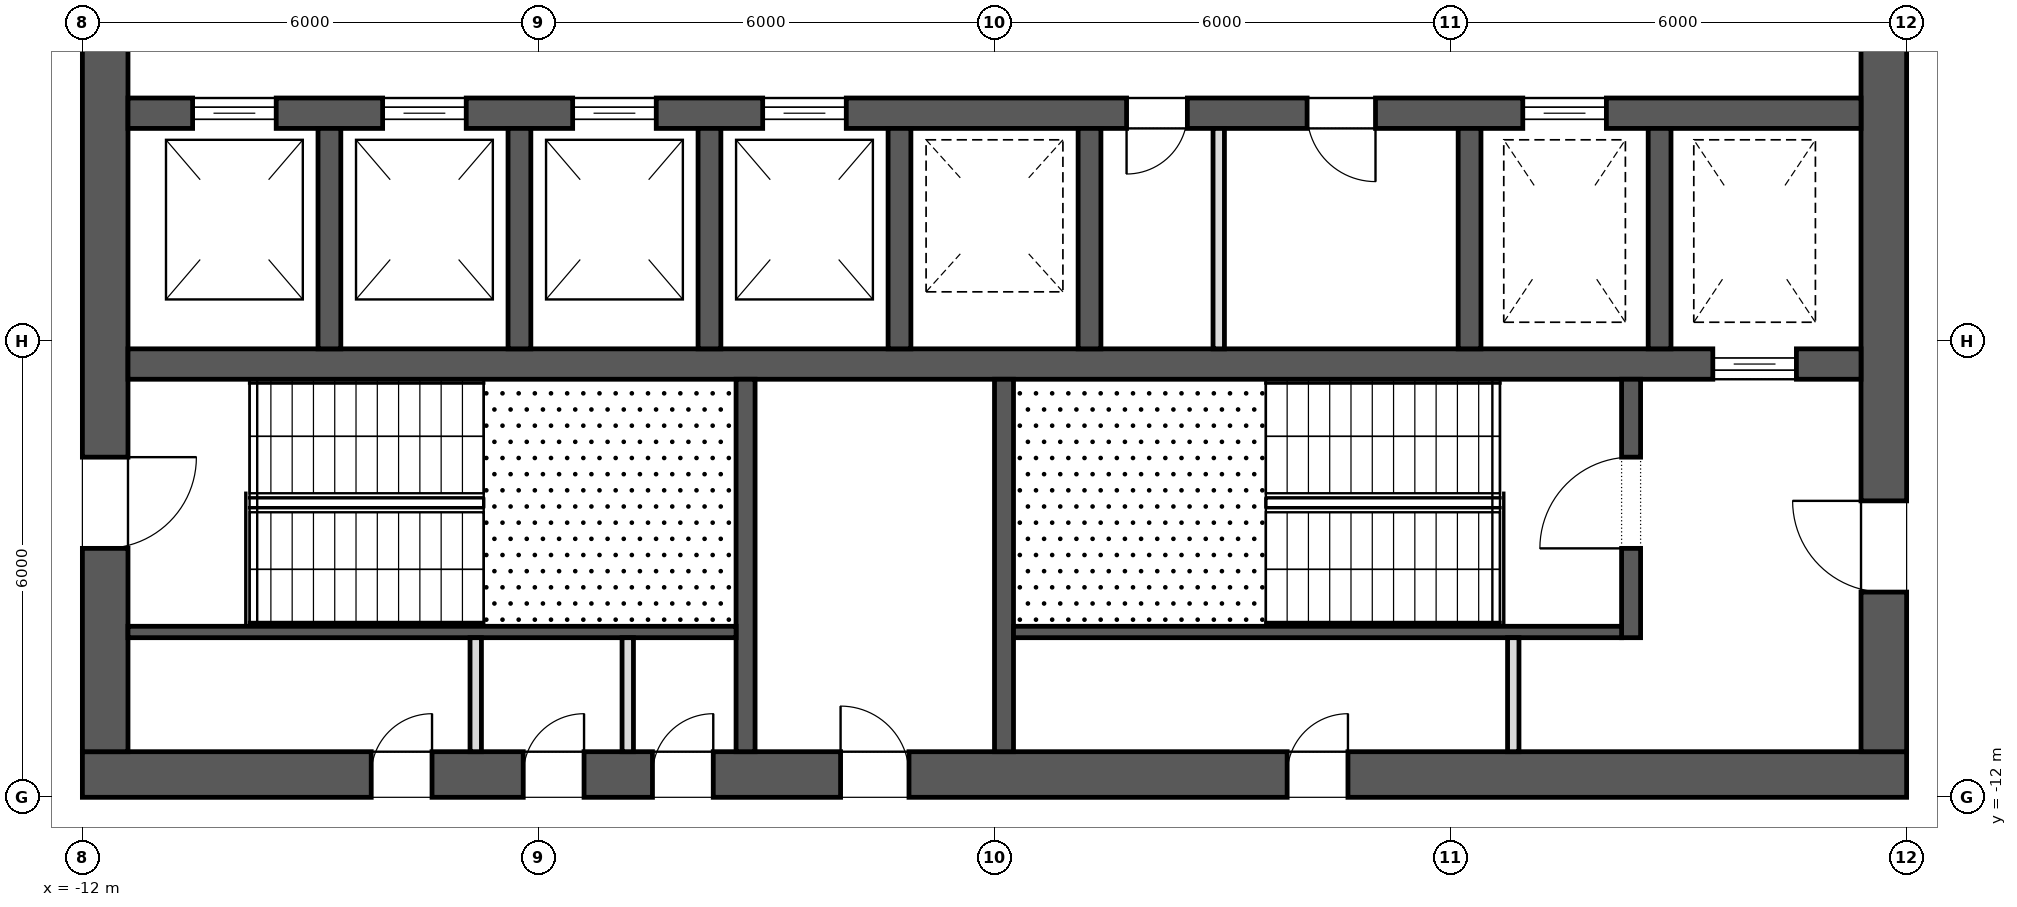
"""IFC4 building model, lengths in metres.
Left out: names, types, materials, properties, quantities, classifications, styles, units other than length and angle.
Written with IfcOpenShell. Run it as: python <this file> out.ifc"""

import sys

from ifc_helpers import new_model, si_unit, direction, frame, frame_2d, origin, place, context, subcontext, project, spatial, rectangle, extrude, element, fill, save


model = new_model("IFC4")
c1 = context("Model", 3, precision=1e-05, world=origin(), true_north=direction((0.0, 1.0)))
c2 = subcontext(c1, "Body", "Model", "MODEL_VIEW")
j1 = project(units=[si_unit("LENGTHUNIT", "METRE"), si_unit("PLANEANGLEUNIT", "RADIAN")], contexts=[c1])
p1 = place(None, origin())
s1 = spatial("IfcSite", under=j1, at=p1, CompositionType="ELEMENT")
p2 = place(p1, origin())
s2 = spatial("IfcBuilding", under=s1, at=p2, CompositionType="ELEMENT")
p3 = place(p2, frame((0.0, 0.0, 178.9)))
s3 = spatial("IfcBuildingStorey", under=s2, at=p3, CompositionType="ELEMENT", Elevation=178.9)
p4 = place(p3, frame((-12.0, -11.7, 0.0), z_axis=(0.0, 0.0, 1.0), x_axis=(1.0, 0.0, 0.0)))
e1 = element("IfcWall", 1, at=p4, inside=s3, PredefinedType="SHEAR", context=c2, shape_type="SweptSolid", body=[
    extrude(rectangle(XDim=24.0, YDim=0.6, at=frame_2d((12.0, 0.0))), origin(), (0.0, 0.0, 1.0), 4.0),
])
p5 = place(p4, frame((9.975, 0.0, 0.0)))
e2 = element("IfcOpeningElement", 2, at=p5, cuts=e1, PredefinedType="OPENING", context=c2, shape_type="SweptSolid", body=[
    extrude(rectangle(XDim=0.9, YDim=2.1, at=frame_2d((0.45, 1.05))), frame((0.0, 0.312, 0.0), z_axis=(0.0, -1.0, 0.0), x_axis=(1.0, 0.0, 0.0)), (0.0, 0.0, 1.0), 0.624),
])
p6 = place(p4, frame((3.8, 0.0, 0.0)))
e3 = element("IfcOpeningElement", 3, at=p6, cuts=e1, PredefinedType="OPENING", context=c2, shape_type="SweptSolid", body=[
    extrude(rectangle(XDim=0.8, YDim=2.1, at=frame_2d((0.4, 1.05))), frame((0.0, 0.312, 0.0), z_axis=(0.0, -1.0, 0.0), x_axis=(1.0, 0.0, 0.0)), (0.0, 0.0, 1.0), 0.624),
])
p7 = place(p4, frame((5.8, 0.0, 0.0)))
e4 = element("IfcOpeningElement", 4, at=p7, cuts=e1, PredefinedType="OPENING", context=c2, shape_type="SweptSolid", body=[
    extrude(rectangle(XDim=0.8, YDim=2.1, at=frame_2d((0.4, 1.05))), frame((0.0, 0.312, 0.0), z_axis=(0.0, -1.0, 0.0), x_axis=(1.0, 0.0, 0.0)), (0.0, 0.0, 1.0), 0.624),
])
p8 = place(p4, frame((7.5, 0.0, 0.0)))
e5 = element("IfcOpeningElement", 5, at=p8, cuts=e1, PredefinedType="OPENING", context=c2, shape_type="SweptSolid", body=[
    extrude(rectangle(XDim=0.8, YDim=2.1, at=frame_2d((0.4, 1.05))), frame((0.0, 0.312, 0.0), z_axis=(0.0, -1.0, 0.0), x_axis=(1.0, 0.0, 0.0)), (0.0, 0.0, 1.0), 0.624),
])
p9 = place(p4, frame((15.85, 0.0, 0.0)))
e6 = element("IfcOpeningElement", 6, at=p9, cuts=e1, PredefinedType="OPENING", context=c2, shape_type="SweptSolid", body=[
    extrude(rectangle(XDim=0.8, YDim=2.1, at=frame_2d((0.4, 1.05))), frame((0.0, 0.312, 0.0), z_axis=(0.0, -1.0, 0.0), x_axis=(1.0, 0.0, 0.0)), (0.0, 0.0, 1.0), 0.624),
])
p10 = place(p3, frame((11.7, -11.4, 0.0), z_axis=(0.0, 0.0, 1.0), x_axis=(0.0, 1.0, 0.0)))
e7 = element("IfcWall", 7, at=p10, inside=s3, PredefinedType="SHEAR", context=c2, shape_type="SweptSolid", body=[
    extrude(rectangle(XDim=22.8, YDim=0.6, at=frame_2d((11.4, 0.0))), origin(), (0.0, 0.0, 1.0), 4.0),
])
p11 = place(p10, frame((10.2, 0.0, 0.0)))
e8 = element("IfcOpeningElement", 8, at=p11, cuts=e7, PredefinedType="OPENING", context=c2, shape_type="SweptSolid", body=[
    extrude(rectangle(XDim=2.4, YDim=2.1, at=frame_2d((1.2, 1.05))), frame((0.0, 0.312, 0.0), z_axis=(0.0, -1.0, 0.0), x_axis=(1.0, 0.0, 0.0)), (0.0, 0.0, 1.0), 0.624),
])
p12 = place(p10, frame((19.5, 0.0, 0.0)))
e9 = element("IfcOpeningElement", 9, at=p12, cuts=e7, PredefinedType="OPENING", context=c2, shape_type="SweptSolid", body=[
    extrude(rectangle(XDim=1.2, YDim=2.1, at=frame_2d((0.6, 1.05))), frame((0.0, 0.312, 0.0), z_axis=(0.0, -1.0, 0.0), x_axis=(1.0, 0.0, 0.0)), (0.0, 0.0, 1.0), 0.624),
])
p13 = place(p10, frame((2.1, 0.0, 0.0)))
e10 = element("IfcOpeningElement", 10, at=p13, cuts=e7, PredefinedType="OPENING", context=c2, shape_type="SweptSolid", body=[
    extrude(rectangle(XDim=1.2, YDim=2.1, at=frame_2d((0.6, 1.05))), frame((0.0, 0.312, 0.0), z_axis=(0.0, -1.0, 0.0), x_axis=(1.0, 0.0, 0.0)), (0.0, 0.0, 1.0), 0.624),
])
p14 = place(p3, frame((-11.7, -11.4, 0.0), z_axis=(0.0, 0.0, 1.0), x_axis=(0.0, 1.0, 0.0)))
e11 = element("IfcWall", 11, at=p14, inside=s3, PredefinedType="SHEAR", context=c2, shape_type="SweptSolid", body=[
    extrude(rectangle(XDim=22.8, YDim=0.6, at=frame_2d((11.4, 0.0))), origin(), (0.0, 0.0, 1.0), 4.0),
])
p15 = place(p14, frame((10.2, 0.0, 0.0)))
e12 = element("IfcOpeningElement", 12, at=p15, cuts=e11, PredefinedType="OPENING", context=c2, shape_type="SweptSolid", body=[
    extrude(rectangle(XDim=2.4, YDim=2.1, at=frame_2d((1.2, 1.05))), frame((0.0, 0.312, 0.0), z_axis=(0.0, -1.0, 0.0), x_axis=(1.0, 0.0, 0.0)), (0.0, 0.0, 1.0), 0.624),
])
p16 = place(p14, frame((18.925, 0.0, 0.0)))
e13 = element("IfcOpeningElement", 13, at=p16, cuts=e11, PredefinedType="OPENING", context=c2, shape_type="SweptSolid", body=[
    extrude(rectangle(XDim=1.2, YDim=2.1, at=frame_2d((0.6, 1.05))), frame((0.0, 0.312, 0.0), z_axis=(0.0, -1.0, 0.0), x_axis=(1.0, 0.0, 0.0)), (0.0, 0.0, 1.0), 0.624),
])
p17 = place(p14, frame((2.675, 0.0, 0.0)))
e14 = element("IfcOpeningElement", 14, at=p17, cuts=e11, PredefinedType="OPENING", context=c2, shape_type="SweptSolid", body=[
    extrude(rectangle(XDim=1.2, YDim=2.1, at=frame_2d((0.6, 1.05))), frame((0.0, 0.312, 0.0), z_axis=(0.0, -1.0, 0.0), x_axis=(1.0, 0.0, 0.0)), (0.0, 0.0, 1.0), 0.624),
])
p18 = place(p3, frame((-11.4, -3.0, 0.0), z_axis=(0.0, 0.0, 1.0), x_axis=(1.0, 0.0, 0.0)))
e15 = element("IfcWall", 15, at=p18, inside=s3, PredefinedType="SHEAR", context=c2, shape_type="SweptSolid", body=[
    extrude(rectangle(XDim=22.8, YDim=0.4, at=frame_2d((11.4, 0.0))), origin(), (0.0, 0.0, 1.0), 4.0),
])
p19 = place(p18, frame((0.85, 0.0, 0.0)))
e16 = element("IfcOpeningElement", 16, at=p19, cuts=e15, PredefinedType="OPENING", context=c2, shape_type="SweptSolid", body=[
    extrude(rectangle(XDim=1.1, YDim=2.1, at=frame_2d((0.55, 1.05))), frame((0.0, 0.212, 0.0), z_axis=(0.0, -1.0, 0.0), x_axis=(1.0, 0.0, 0.0)), (0.0, 0.0, 1.0), 0.424),
])
p20 = place(p18, frame((3.35, 0.0, 0.0)))
e17 = element("IfcOpeningElement", 17, at=p20, cuts=e15, PredefinedType="OPENING", context=c2, shape_type="SweptSolid", body=[
    extrude(rectangle(XDim=1.1, YDim=2.1, at=frame_2d((0.55, 1.05))), frame((0.0, 0.212, 0.0), z_axis=(0.0, -1.0, 0.0), x_axis=(1.0, 0.0, 0.0)), (0.0, 0.0, 1.0), 0.424),
])
p21 = place(p18, frame((5.85, 0.0, 0.0)))
e18 = element("IfcOpeningElement", 18, at=p21, cuts=e15, PredefinedType="OPENING", context=c2, shape_type="SweptSolid", body=[
    extrude(rectangle(XDim=1.1, YDim=2.1, at=frame_2d((0.55, 1.05))), frame((0.0, 0.212, 0.0), z_axis=(0.0, -1.0, 0.0), x_axis=(1.0, 0.0, 0.0)), (0.0, 0.0, 1.0), 0.424),
])
p22 = place(p18, frame((8.35, 0.0, 0.0)))
e19 = element("IfcOpeningElement", 19, at=p22, cuts=e15, PredefinedType="OPENING", context=c2, shape_type="SweptSolid", body=[
    extrude(rectangle(XDim=1.1, YDim=2.1, at=frame_2d((0.55, 1.05))), frame((0.0, 0.212, 0.0), z_axis=(0.0, -1.0, 0.0), x_axis=(1.0, 0.0, 0.0)), (0.0, 0.0, 1.0), 0.424),
])
p23 = place(p18, frame((18.35, 0.0, 0.0)))
e20 = element("IfcOpeningElement", 20, at=p23, cuts=e15, PredefinedType="OPENING", context=c2, shape_type="SweptSolid", body=[
    extrude(rectangle(XDim=1.1, YDim=2.1, at=frame_2d((0.55, 1.05))), frame((0.0, 0.212, 0.0), z_axis=(0.0, -1.0, 0.0), x_axis=(1.0, 0.0, 0.0)), (0.0, 0.0, 1.0), 0.424),
])
p24 = place(p18, frame((13.137, 0.0, 0.0)))
e21 = element("IfcOpeningElement", 21, at=p24, cuts=e15, PredefinedType="OPENING", context=c2, shape_type="SweptSolid", body=[
    extrude(rectangle(XDim=0.8, YDim=2.1, at=frame_2d((0.4, 1.05))), frame((0.0, 0.212, 0.0), z_axis=(0.0, -1.0, 0.0), x_axis=(1.0, 0.0, 0.0)), (0.0, 0.0, 1.0), 0.424),
])
p25 = place(p18, frame((15.512, 0.0, 0.0)))
e22 = element("IfcOpeningElement", 22, at=p25, cuts=e15, PredefinedType="OPENING", context=c2, shape_type="SweptSolid", body=[
    extrude(rectangle(XDim=0.9, YDim=2.1, at=frame_2d((0.45, 1.05))), frame((0.0, 0.212, 0.0), z_axis=(0.0, -1.0, 0.0), x_axis=(1.0, 0.0, 0.0)), (0.0, 0.0, 1.0), 0.424),
])
p26 = place(p3, frame((-11.4, -6.3, 0.0), z_axis=(0.0, 0.0, 1.0), x_axis=(1.0, 0.0, 0.0)))
e23 = element("IfcWall", 23, at=p26, inside=s3, PredefinedType="SHEAR", context=c2, shape_type="SweptSolid", body=[
    extrude(rectangle(XDim=22.8, YDim=0.4, at=frame_2d((11.4, 0.0))), origin(), (0.0, 0.0, 1.0), 4.0),
])
p27 = place(p26, frame((20.85, 0.0, 0.0)))
e24 = element("IfcOpeningElement", 24, at=p27, cuts=e23, PredefinedType="OPENING", context=c2, shape_type="SweptSolid", body=[
    extrude(rectangle(XDim=1.1, YDim=2.1, at=frame_2d((0.55, 1.05))), frame((0.0, 0.212, 0.0), z_axis=(0.0, -1.0, 0.0), x_axis=(1.0, 0.0, 0.0)), (0.0, 0.0, 1.0), 0.424),
])
for number, where, z_axis, x_axis in (
    (25, (-8.75, -6.1, 0.0), (0.0, 0.0, 1.0), (0.0, 1.0, 0.0)),
    (26, (-6.25, -6.1, 0.0), (0.0, 0.0, 1.0), (0.0, 1.0, 0.0)),
    (27, (-3.75, -6.1, 0.0), (0.0, 0.0, 1.0), (0.0, 1.0, 0.0)),
    (28, (-1.25, -6.1, 0.0), (0.0, 0.0, 1.0), (0.0, 1.0, 0.0)),
    (29, (1.25, -6.1, 0.0), (0.0, 0.0, 1.0), (0.0, 1.0, 0.0)),
    (30, (6.25, -6.1, 0.0), (0.0, 0.0, 1.0), (0.0, 1.0, 0.0)),
    (31, (8.75, -6.1, 0.0), (0.0, 0.0, 1.0), (0.0, 1.0, 0.0)),
):
    element("IfcWall", number, at=place(p3, frame(where, z_axis=z_axis, x_axis=x_axis)), inside=s3, PredefinedType="SHEAR", context=c2, shape_type="SweptSolid", body=[
        extrude(rectangle(XDim=2.9, YDim=0.3, at=frame_2d((1.45, 0.0))), origin(), (0.0, 0.0, 1.0), 4.0),
    ])
for number, where, z_axis, x_axis in (
    (32, (-3.275, -11.4, 0.0), (0.0, 0.0, 1.0), (0.0, 1.0, 0.0)),
    (33, (0.125, -11.4, 0.0), (0.0, 0.0, 1.0), (0.0, 1.0, 0.0)),
):
    element("IfcWall", number, at=place(p3, frame(where, z_axis=z_axis, x_axis=x_axis)), inside=s3, PredefinedType="SHEAR", context=c2, shape_type="SweptSolid", body=[
        extrude(rectangle(XDim=4.9, YDim=0.25, at=frame_2d((2.45, 0.0))), origin(), (0.0, 0.0, 1.0), 3.7),
    ])
p28 = place(p3, frame((8.375, -9.9, 0.0), z_axis=(0.0, 0.0, 1.0), x_axis=(0.0, 1.0, 0.0)))
e34 = element("IfcWall", 34, at=p28, inside=s3, PredefinedType="SHEAR", context=c2, shape_type="SweptSolid", body=[
    extrude(rectangle(XDim=3.4, YDim=0.25, at=frame_2d((1.7, 0.0))), origin(), (0.0, 0.0, 1.0), 3.7),
])
p29 = place(p28, frame((1.175, 0.0, 0.0)))
e35 = element("IfcOpeningElement", 35, at=p29, cuts=e34, PredefinedType="OPENING", context=c2, shape_type="SweptSolid", body=[
    extrude(rectangle(XDim=1.2, YDim=2.1, at=frame_2d((0.6, 1.05))), frame((0.0, 0.137, 0.0), z_axis=(0.0, -1.0, 0.0), x_axis=(1.0, 0.0, 0.0)), (0.0, 0.0, 1.0), 0.274),
])
for number, where, z_axis, x_axis in (
    (36, (-11.4, -9.825, 0.0), (0.0, 0.0, 1.0), (1.0, 0.0, 0.0)),
    (37, (0.25, -9.825, 0.0), (0.0, 0.0, 1.0), (1.0, 0.0, 0.0)),
):
    element("IfcWall", number, at=place(p3, frame(where, z_axis=z_axis, x_axis=x_axis)), inside=s3, PredefinedType="SHEAR", context=c2, shape_type="SweptSolid", body=[
        extrude(rectangle(XDim=8.0, YDim=0.15, at=frame_2d((4.0, 0.0))), origin(), (0.0, 0.0, 1.0), 3.7),
    ])
for number, where, z_axis, x_axis in (
    (38, (-6.825, -11.4, 0.0), (0.0, 0.0, 1.0), (0.0, 1.0, 0.0)),
    (39, (-4.825, -11.4, 0.0), (0.0, 0.0, 1.0), (0.0, 1.0, 0.0)),
    (40, (6.825, -11.4, 0.0), (0.0, 0.0, 1.0), (0.0, 1.0, 0.0)),
):
    element("IfcWall", number, at=place(p3, frame(where, z_axis=z_axis, x_axis=x_axis)), inside=s3, PredefinedType="PARTITIONING", context=c2, shape_type="SweptSolid", body=[
        extrude(rectangle(XDim=1.5, YDim=0.15, at=frame_2d((0.75, 0.0))), origin(), (0.0, 0.0, 1.0), 3.7),
    ])
p30 = place(p3, frame((2.95, -6.1, 0.0), z_axis=(0.0, 0.0, 1.0), x_axis=(0.0, 1.0, 0.0)))
e41 = element("IfcWall", 41, at=p30, inside=s3, PredefinedType="PARTITIONING", context=c2, shape_type="SweptSolid", body=[
    extrude(rectangle(XDim=2.9, YDim=0.15, at=frame_2d((1.45, 0.0))), origin(), (0.0, 0.0, 1.0), 3.7),
])
p31 = place(p27, origin())
e42 = element("IfcDoor", 42, at=p31, inside=s3, OperationType="SLIDING_TO_LEFT", PredefinedType="DOOR", context=c2, shape_type="SweptSolid", body=[
    extrude(rectangle(XDim=1.1, YDim=2.1, at=frame_2d((0.55, 1.05))), frame((0.0, 0.025, 0.0), z_axis=(0.0, -1.0, 0.0), x_axis=(1.0, 0.0, 0.0)), (0.0, 0.0, 1.0), 0.05),
])
fill(e24, e42)
p32 = place(p19, origin())
e43 = element("IfcDoor", 43, at=p32, inside=s3, OperationType="SLIDING_TO_LEFT", PredefinedType="DOOR", context=c2, shape_type="SweptSolid", body=[
    extrude(rectangle(XDim=1.1, YDim=2.1, at=frame_2d((0.55, 1.05))), frame((0.0, 0.025, 0.0), z_axis=(0.0, -1.0, 0.0), x_axis=(1.0, 0.0, 0.0)), (0.0, 0.0, 1.0), 0.05),
])
fill(e16, e43)
p33 = place(p20, origin())
e44 = element("IfcDoor", 44, at=p33, inside=s3, OperationType="SLIDING_TO_LEFT", PredefinedType="DOOR", context=c2, shape_type="SweptSolid", body=[
    extrude(rectangle(XDim=1.1, YDim=2.1, at=frame_2d((0.55, 1.05))), frame((0.0, 0.025, 0.0), z_axis=(0.0, -1.0, 0.0), x_axis=(1.0, 0.0, 0.0)), (0.0, 0.0, 1.0), 0.05),
])
fill(e17, e44)
p34 = place(p21, origin())
e45 = element("IfcDoor", 45, at=p34, inside=s3, OperationType="SLIDING_TO_LEFT", PredefinedType="DOOR", context=c2, shape_type="SweptSolid", body=[
    extrude(rectangle(XDim=1.1, YDim=2.1, at=frame_2d((0.55, 1.05))), frame((0.0, 0.025, 0.0), z_axis=(0.0, -1.0, 0.0), x_axis=(1.0, 0.0, 0.0)), (0.0, 0.0, 1.0), 0.05),
])
fill(e18, e45)
p35 = place(p22, origin())
e46 = element("IfcDoor", 46, at=p35, inside=s3, OperationType="SLIDING_TO_LEFT", PredefinedType="DOOR", context=c2, shape_type="SweptSolid", body=[
    extrude(rectangle(XDim=1.1, YDim=2.1, at=frame_2d((0.55, 1.05))), frame((0.0, 0.025, 0.0), z_axis=(0.0, -1.0, 0.0), x_axis=(1.0, 0.0, 0.0)), (0.0, 0.0, 1.0), 0.05),
])
fill(e19, e46)
p36 = place(p23, origin())
e47 = element("IfcDoor", 47, at=p36, inside=s3, OperationType="SLIDING_TO_LEFT", PredefinedType="DOOR", context=c2, shape_type="SweptSolid", body=[
    extrude(rectangle(XDim=1.1, YDim=2.1, at=frame_2d((0.55, 1.05))), frame((0.0, 0.025, 0.0), z_axis=(0.0, -1.0, 0.0), x_axis=(1.0, 0.0, 0.0)), (0.0, 0.0, 1.0), 0.05),
])
fill(e20, e47)
p37 = place(p17, frame((1.2, 0.0, 0.0), z_axis=(0.0, 0.0, 1.0), x_axis=(-1.0, 0.0, 0.0)))
e48 = element("IfcDoor", 48, at=p37, inside=s3, OperationType="SINGLE_SWING_RIGHT", PredefinedType="DOOR", context=c2, shape_type="SweptSolid", body=[
    extrude(rectangle(XDim=1.2, YDim=2.1, at=frame_2d((0.6, 1.05))), frame((0.0, 0.025, 0.0), z_axis=(0.0, -1.0, 0.0), x_axis=(1.0, 0.0, 0.0)), (0.0, 0.0, 1.0), 0.05),
])
fill(e14, e48)
p38 = place(p29, origin())
e49 = element("IfcDoor", 49, at=p38, inside=s3, OperationType="SINGLE_SWING_RIGHT", PredefinedType="DOOR", context=c2, shape_type="SweptSolid", body=[
    extrude(rectangle(XDim=1.2, YDim=2.1, at=frame_2d((0.6, 1.05))), frame((0.0, 0.025, 0.0), z_axis=(0.0, -1.0, 0.0), x_axis=(1.0, 0.0, 0.0)), (0.0, 0.0, 1.0), 0.05),
])
fill(e35, e49)
p39 = place(p13, origin())
e50 = element("IfcDoor", 50, at=p39, inside=s3, OperationType="SINGLE_SWING_LEFT", PredefinedType="DOOR", context=c2, shape_type="SweptSolid", body=[
    extrude(rectangle(XDim=1.2, YDim=2.1, at=frame_2d((0.6, 1.05))), frame((0.0, 0.025, 0.0), z_axis=(0.0, -1.0, 0.0), x_axis=(1.0, 0.0, 0.0)), (0.0, 0.0, 1.0), 0.05),
])
fill(e10, e50)
p40 = place(p5, origin())
e51 = element("IfcDoor", 51, at=p40, inside=s3, OperationType="SINGLE_SWING_RIGHT", PredefinedType="DOOR", context=c2, shape_type="SweptSolid", body=[
    extrude(rectangle(XDim=0.9, YDim=2.1, at=frame_2d((0.45, 1.05))), frame((0.0, 0.025, 0.0), z_axis=(0.0, -1.0, 0.0), x_axis=(1.0, 0.0, 0.0)), (0.0, 0.0, 1.0), 0.05),
])
fill(e2, e51)
p41 = place(p6, origin())
e52 = element("IfcDoor", 52, at=p41, inside=s3, OperationType="SINGLE_SWING_LEFT", PredefinedType="DOOR", context=c2, shape_type="SweptSolid", body=[
    extrude(rectangle(XDim=0.8, YDim=2.1, at=frame_2d((0.4, 1.05))), frame((0.0, 0.025, 0.0), z_axis=(0.0, -1.0, 0.0), x_axis=(1.0, 0.0, 0.0)), (0.0, 0.0, 1.0), 0.05),
])
fill(e3, e52)
p42 = place(p7, origin())
e53 = element("IfcDoor", 53, at=p42, inside=s3, OperationType="SINGLE_SWING_LEFT", PredefinedType="DOOR", context=c2, shape_type="SweptSolid", body=[
    extrude(rectangle(XDim=0.8, YDim=2.1, at=frame_2d((0.4, 1.05))), frame((0.0, 0.025, 0.0), z_axis=(0.0, -1.0, 0.0), x_axis=(1.0, 0.0, 0.0)), (0.0, 0.0, 1.0), 0.05),
])
fill(e4, e53)
p43 = place(p8, origin())
e54 = element("IfcDoor", 54, at=p43, inside=s3, OperationType="SINGLE_SWING_LEFT", PredefinedType="DOOR", context=c2, shape_type="SweptSolid", body=[
    extrude(rectangle(XDim=0.8, YDim=2.1, at=frame_2d((0.4, 1.05))), frame((0.0, 0.025, 0.0), z_axis=(0.0, -1.0, 0.0), x_axis=(1.0, 0.0, 0.0)), (0.0, 0.0, 1.0), 0.05),
])
fill(e5, e54)
p44 = place(p9, origin())
e55 = element("IfcDoor", 55, at=p44, inside=s3, OperationType="SINGLE_SWING_LEFT", PredefinedType="DOOR", context=c2, shape_type="SweptSolid", body=[
    extrude(rectangle(XDim=0.8, YDim=2.1, at=frame_2d((0.4, 1.05))), frame((0.0, 0.025, 0.0), z_axis=(0.0, -1.0, 0.0), x_axis=(1.0, 0.0, 0.0)), (0.0, 0.0, 1.0), 0.05),
])
fill(e6, e55)
p45 = place(p24, frame((0.8, 0.0, 0.0), z_axis=(0.0, 0.0, 1.0), x_axis=(-1.0, 0.0, 0.0)))
e56 = element("IfcDoor", 56, at=p45, inside=s3, OperationType="SINGLE_SWING_LEFT", PredefinedType="DOOR", context=c2, shape_type="SweptSolid", body=[
    extrude(rectangle(XDim=0.8, YDim=2.1, at=frame_2d((0.4, 1.05))), frame((0.0, 0.025, 0.0), z_axis=(0.0, -1.0, 0.0), x_axis=(1.0, 0.0, 0.0)), (0.0, 0.0, 1.0), 0.05),
])
fill(e21, e56)
p46 = place(p25, frame((0.9, 0.0, 0.0), z_axis=(0.0, 0.0, 1.0), x_axis=(-1.0, 0.0, 0.0)))
e57 = element("IfcDoor", 57, at=p46, inside=s3, OperationType="SINGLE_SWING_RIGHT", PredefinedType="DOOR", context=c2, shape_type="SweptSolid", body=[
    extrude(rectangle(XDim=0.9, YDim=2.1, at=frame_2d((0.45, 1.05))), frame((0.0, 0.025, 0.0), z_axis=(0.0, -1.0, 0.0), x_axis=(1.0, 0.0, 0.0)), (0.0, 0.0, 1.0), 0.05),
])
fill(e22, e57)
save(model, sys.argv[1])
